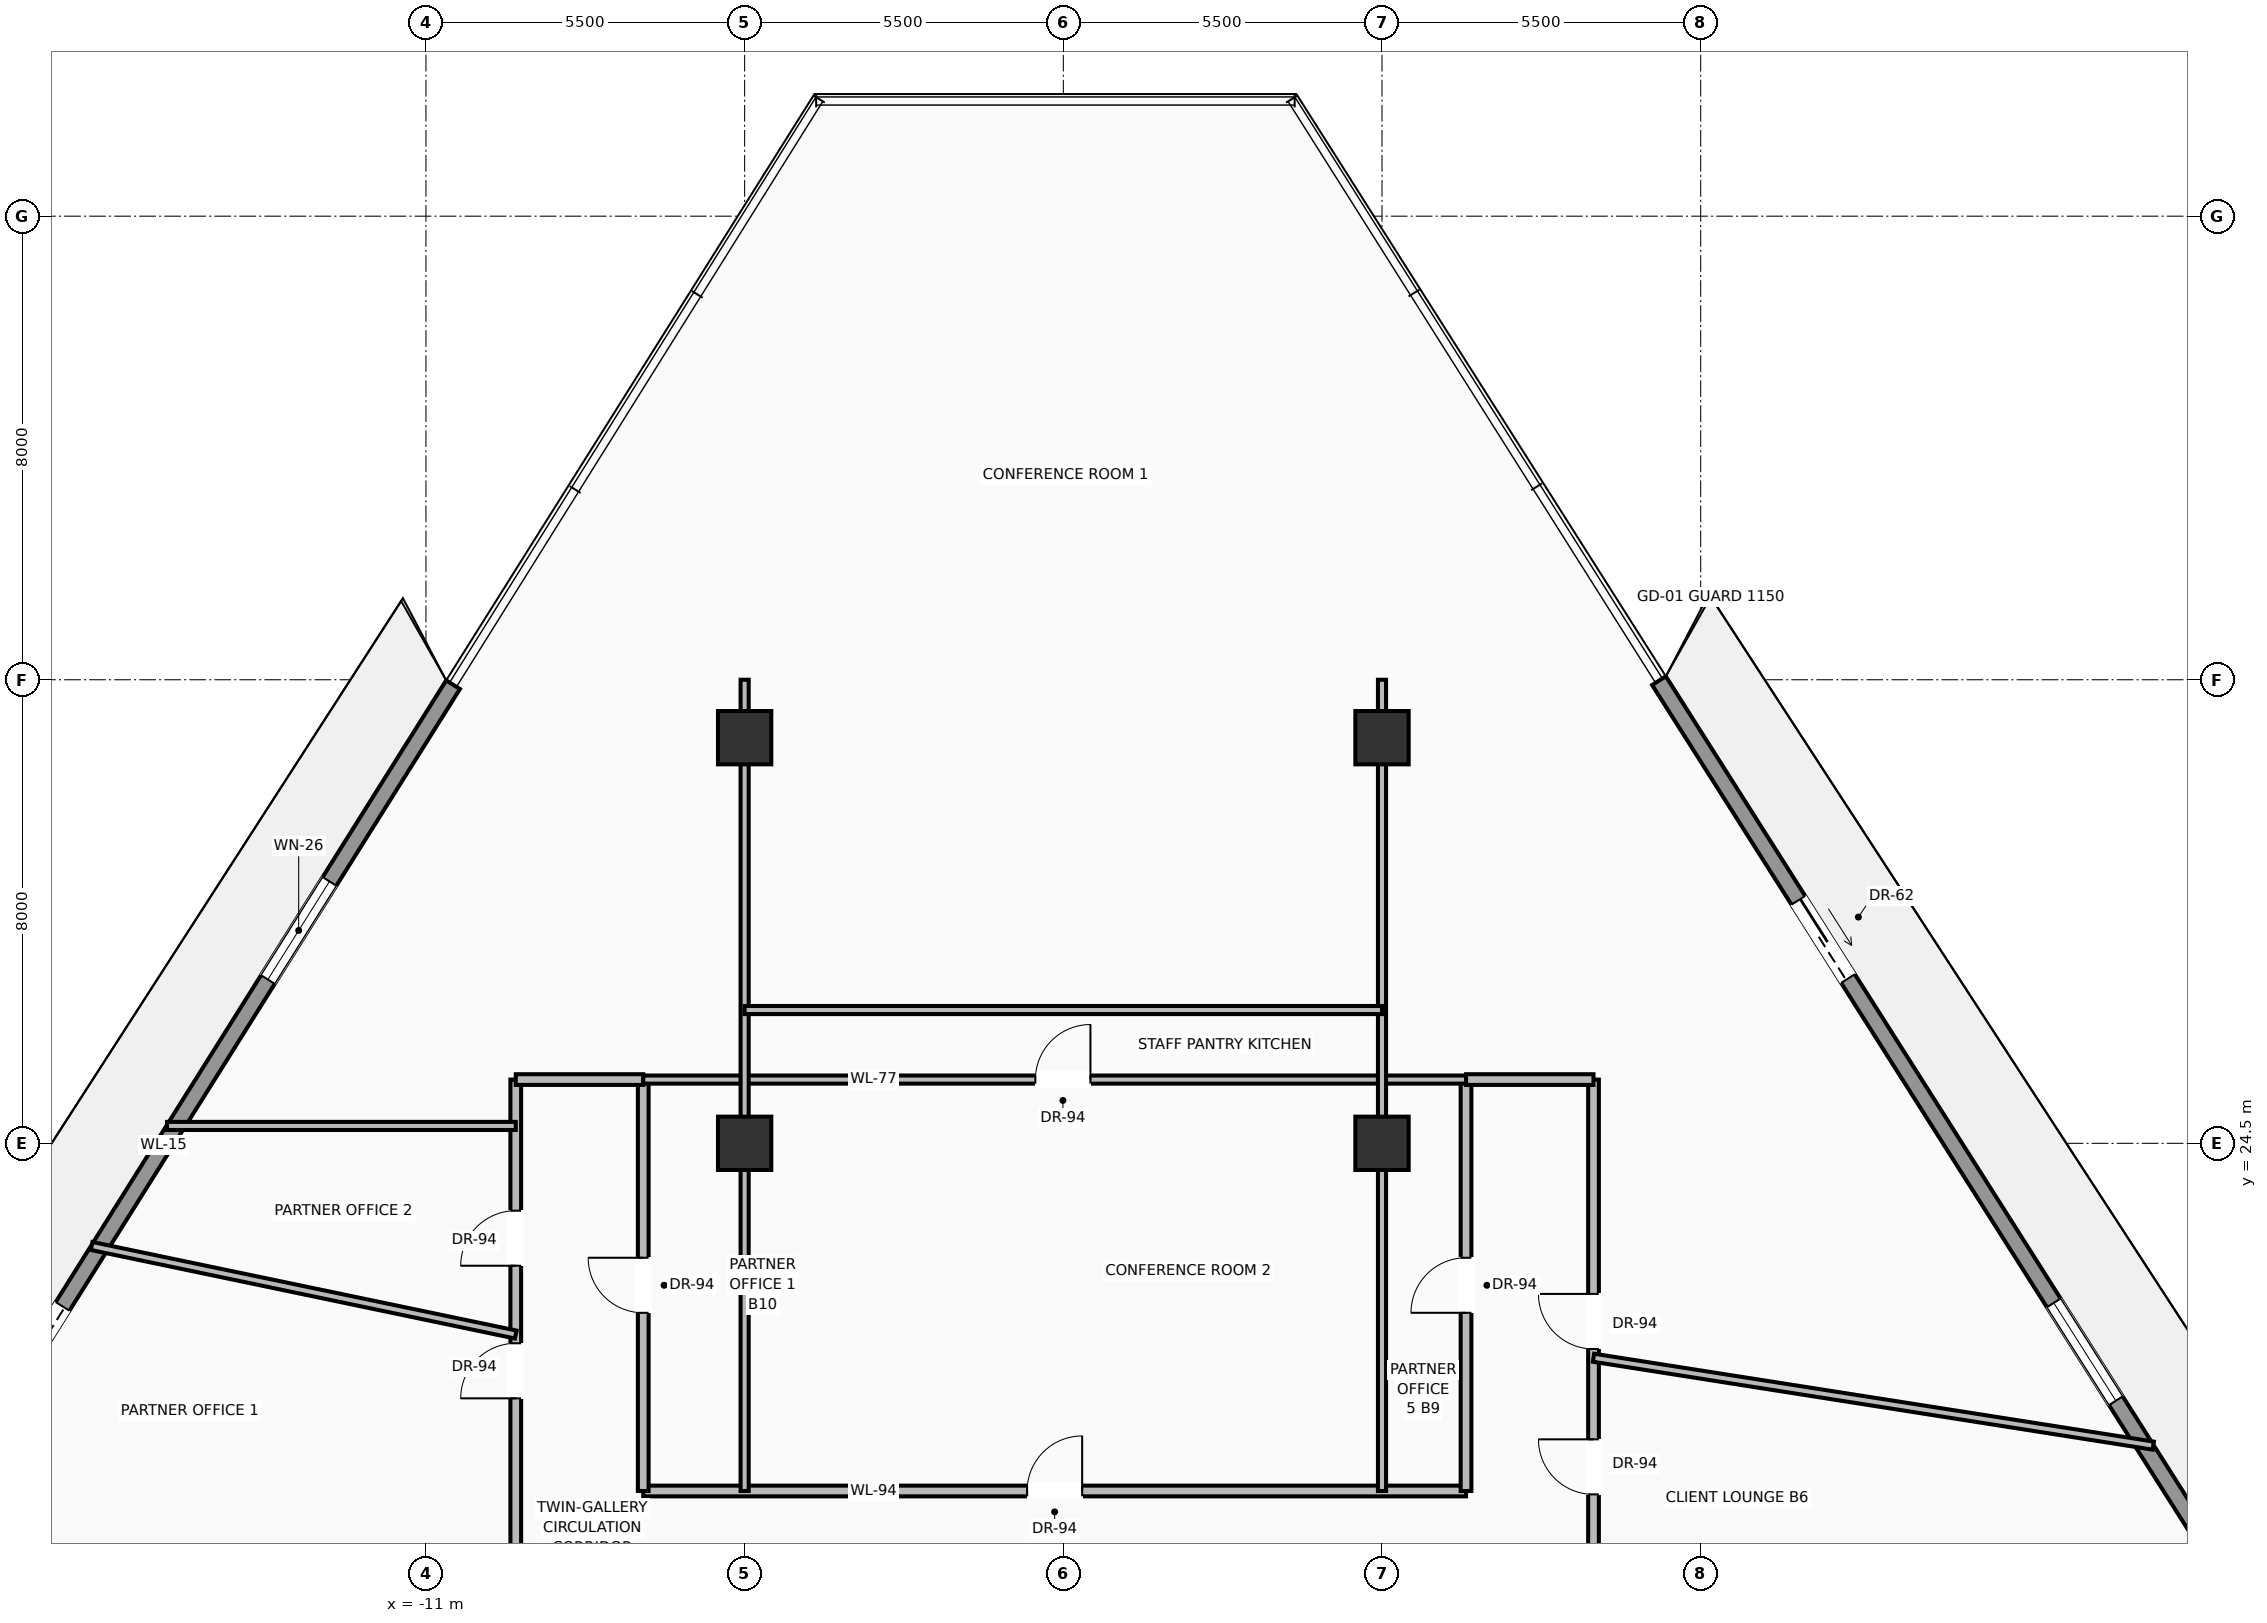
"""IFC4 building model, lengths in metres.
Left out: names, types, materials, properties, quantities, classifications, styles, units other than length and angle.
Written with IfcOpenShell. Run it as: python <this file> out.ifc"""

import sys

from ifc_helpers import new_model, si_unit, direction, frame, frame_2d, origin, origin_2d, place, context, subcontext, project, spatial, rectangle, extrude, source, transform, mapped, element, fill, save


model = new_model("IFC4")
c1 = context("Model", 3, precision=1e-05, world=origin(), true_north=direction((0.0, 1.0)))
c2 = subcontext(c1, "Body", "Model", "MODEL_VIEW")
j1 = project(units=[si_unit("LENGTHUNIT", "METRE"), si_unit("PLANEANGLEUNIT", "RADIAN")], contexts=[c1])
p1 = place(None, origin())
s1 = spatial("IfcSite", under=j1, at=p1, CompositionType="ELEMENT")
p2 = place(p1, origin())
s2 = spatial("IfcBuilding", under=s1, at=p2, CompositionType="ELEMENT")
p3 = place(p2, frame((0.0, 0.0, 174.7)))
s3 = spatial("IfcBuildingStorey", under=s2, at=p3, CompositionType="ELEMENT", Elevation=174.7)
m1 = source(origin(), c2, "Body", "SweptSolid", [
    extrude(rectangle(XDim=0.92, YDim=0.92, at=origin_2d()), origin(), (0.0, 0.0, 1.0), 3.7),
])
for number, where, z_axis, x_axis in (
    (1, (-5.5, 24.5, 0.0), (0.0, 0.0, 1.0), (1.0, 0.0, 0.0)),
    (2, (5.5, 24.5, 0.0), (0.0, 0.0, 1.0), (1.0, 0.0, 0.0)),
    (3, (-5.5, 31.5, 0.0), (0.0, 0.0, 1.0), (1.0, 0.0, 0.0)),
    (4, (5.5, 31.5, 0.0), (0.0, 0.0, 1.0), (1.0, 0.0, 0.0)),
):
    element("IfcColumn", number, at=place(p3, frame(where, z_axis=z_axis, x_axis=x_axis)), inside=s3, PredefinedType="COLUMN", context=c2, shape_type="MappedRepresentation", body=[
        mapped(m1, transform((0.0, 0.0, 0.0), scale=1.0)),
    ])
p4 = place(p3, frame((-20.519, 16.514, 0.0), z_axis=(0.0, 0.0, 1.0), x_axis=(0.531871143151, 0.846825299034, 0.0)))
e5 = element("IfcWall", 5, at=p4, inside=s3, PredefinedType="SOLIDWALL", context=c2, shape_type="SweptSolid", body=[
    extrude(rectangle(XDim=18.777, YDim=0.28, at=frame_2d((9.388, 0.0))), origin(), (0.0, 0.0, 1.0), 3.05),
])
p5 = place(p4, frame((4.506, 0.0, 0.0)))
e6 = element("IfcOpeningElement", 6, at=p5, cuts=e5, PredefinedType="OPENING", context=c2, shape_type="SweptSolid", body=[
    extrude(rectangle(XDim=1.6, YDim=2.35, at=frame_2d((0.8, 1.175))), frame((0.0, 0.15, 0.0), z_axis=(0.0, -1.0, 0.0), x_axis=(1.0, 0.0, 0.0)), (0.0, 0.0, 1.0), 0.3),
])
p6 = place(p4, frame((12.768, 0.0, 0.9)))
e7 = element("IfcOpeningElement", 7, at=p6, cuts=e5, PredefinedType="OPENING", context=c2, shape_type="SweptSolid", body=[
    extrude(rectangle(XDim=2.0, YDim=1.85, at=frame_2d((1.0, 0.925))), frame((0.0, 0.15, 0.0), z_axis=(0.0, -1.0, 0.0), x_axis=(1.0, 0.0, 0.0)), (0.0, 0.0, 1.0), 0.3),
])
p7 = place(p3, frame((10.28, 32.484, 0.0), z_axis=(0.0, 0.0, 1.0), x_axis=(0.53575660665, -0.844372464278, 0.0)))
e8 = element("IfcWall", 8, at=p7, inside=s3, PredefinedType="SOLIDWALL", context=c2, shape_type="SweptSolid", body=[
    extrude(rectangle(XDim=18.701, YDim=0.28, at=frame_2d((9.351, 0.0))), origin(), (0.0, 0.0, 1.0), 3.05),
])
p8 = place(p7, frame((4.488, 0.0, 0.0)))
e9 = element("IfcOpeningElement", 9, at=p8, cuts=e8, PredefinedType="OPENING", context=c2, shape_type="SweptSolid", body=[
    extrude(rectangle(XDim=1.6, YDim=2.35, at=frame_2d((0.8, 1.175))), frame((0.0, 0.15, 0.0), z_axis=(0.0, -1.0, 0.0), x_axis=(1.0, 0.0, 0.0)), (0.0, 0.0, 1.0), 0.3),
])
p9 = place(p7, frame((12.717, 0.0, 0.9)))
e10 = element("IfcOpeningElement", 10, at=p9, cuts=e8, PredefinedType="OPENING", context=c2, shape_type="SweptSolid", body=[
    extrude(rectangle(XDim=2.0, YDim=1.85, at=frame_2d((1.0, 0.925))), frame((0.0, 0.15, 0.0), z_axis=(0.0, -1.0, 0.0), x_axis=(1.0, 0.0, 0.0)), (0.0, 0.0, 1.0), 0.3),
])
p10 = place(p3, frame((-7.25, 18.5, 0.0), z_axis=(0.0, 0.0, 1.0), x_axis=(1.0, 0.0, 0.0)))
e11 = element("IfcWall", 11, at=p10, inside=s3, PredefinedType="PARTITIONING", context=c2, shape_type="SweptSolid", body=[
    extrude(rectangle(XDim=14.2, YDim=0.185, at=frame_2d((7.1, 0.0))), origin(), (0.0, 0.0, 1.0), 2.846),
])
p11 = place(p10, frame((6.625, 0.0, 0.0)))
e12 = element("IfcOpeningElement", 12, at=p11, cuts=e11, PredefinedType="OPENING", context=c2, shape_type="SweptSolid", body=[
    extrude(rectangle(XDim=0.95, YDim=2.2, at=frame_2d((0.475, 1.1))), frame((0.0, 0.103, 0.0), z_axis=(0.0, -1.0, 0.0), x_axis=(1.0, 0.0, 0.0)), (0.0, 0.0, 1.0), 0.205),
])
p12 = place(p3, frame((-7.25, 18.5, 0.0), z_axis=(0.0, 0.0, 1.0), x_axis=(0.0, 1.0, 0.0)))
e13 = element("IfcWall", 13, at=p12, inside=s3, PredefinedType="PARTITIONING", context=c2, shape_type="SweptSolid", body=[
    extrude(rectangle(XDim=7.1, YDim=0.185, at=frame_2d((3.55, 0.0))), origin(), (0.0, 0.0, 1.0), 2.846),
])
p13 = place(p12, frame((3.075, 0.0, 0.0)))
e14 = element("IfcOpeningElement", 14, at=p13, cuts=e13, PredefinedType="OPENING", context=c2, shape_type="SweptSolid", body=[
    extrude(rectangle(XDim=0.95, YDim=2.2, at=frame_2d((0.475, 1.1))), frame((0.0, 0.103, 0.0), z_axis=(0.0, -1.0, 0.0), x_axis=(1.0, 0.0, 0.0)), (0.0, 0.0, 1.0), 0.205),
])
p14 = place(p3, frame((6.95, 18.5, 0.0), z_axis=(0.0, 0.0, 1.0), x_axis=(0.0, 1.0, 0.0)))
e15 = element("IfcWall", 15, at=p14, inside=s3, PredefinedType="PARTITIONING", context=c2, shape_type="SweptSolid", body=[
    extrude(rectangle(XDim=7.1, YDim=0.185, at=frame_2d((3.55, 0.0))), origin(), (0.0, 0.0, 1.0), 2.846),
])
p15 = place(p14, frame((3.075, 0.0, 0.0)))
e16 = element("IfcOpeningElement", 16, at=p15, cuts=e15, PredefinedType="OPENING", context=c2, shape_type="SweptSolid", body=[
    extrude(rectangle(XDim=0.95, YDim=2.2, at=frame_2d((0.475, 1.1))), frame((0.0, 0.103, 0.0), z_axis=(0.0, -1.0, 0.0), x_axis=(1.0, 0.0, 0.0)), (0.0, 0.0, 1.0), 0.205),
])
p16 = place(p3, frame((-9.45, 16.4, 0.0), z_axis=(0.0, 0.0, 1.0), x_axis=(0.0, 1.0, 0.0)))
e17 = element("IfcWall", 17, at=p16, inside=s3, PredefinedType="PARTITIONING", context=c2, shape_type="SweptSolid", body=[
    extrude(rectangle(XDim=9.2, YDim=0.185, at=frame_2d((4.6, 0.0))), origin(), (0.0, 0.0, 1.0), 2.846),
])
p17 = place(p16, frame((3.699, 0.0, 0.0)))
e18 = element("IfcOpeningElement", 18, at=p17, cuts=e17, PredefinedType="OPENING", context=c2, shape_type="SweptSolid", body=[
    extrude(rectangle(XDim=0.95, YDim=2.2, at=frame_2d((0.475, 1.1))), frame((0.0, 0.103, 0.0), z_axis=(0.0, -1.0, 0.0), x_axis=(1.0, 0.0, 0.0)), (0.0, 0.0, 1.0), 0.205),
])
p18 = place(p16, frame((5.988, 0.0, 0.0)))
e19 = element("IfcOpeningElement", 19, at=p18, cuts=e17, PredefinedType="OPENING", context=c2, shape_type="SweptSolid", body=[
    extrude(rectangle(XDim=0.95, YDim=2.2, at=frame_2d((0.475, 1.1))), frame((0.0, 0.103, 0.0), z_axis=(0.0, -1.0, 0.0), x_axis=(1.0, 0.0, 0.0)), (0.0, 0.0, 1.0), 0.205),
])
p19 = place(p3, frame((9.15, 16.4, 0.0), z_axis=(0.0, 0.0, 1.0), x_axis=(0.0, 1.0, 0.0)))
e20 = element("IfcWall", 20, at=p19, inside=s3, PredefinedType="PARTITIONING", context=c2, shape_type="SweptSolid", body=[
    extrude(rectangle(XDim=9.2, YDim=0.185, at=frame_2d((4.6, 0.0))), origin(), (0.0, 0.0, 1.0), 2.846),
])
p20 = place(p19, frame((4.551, 0.0, 0.0)))
e21 = element("IfcOpeningElement", 21, at=p20, cuts=e20, PredefinedType="OPENING", context=c2, shape_type="SweptSolid", body=[
    extrude(rectangle(XDim=0.95, YDim=2.2, at=frame_2d((0.475, 1.1))), frame((0.0, 0.103, 0.0), z_axis=(0.0, -1.0, 0.0), x_axis=(1.0, 0.0, 0.0)), (0.0, 0.0, 1.0), 0.205),
])
p21 = place(p19, frame((2.042, 0.0, 0.0)))
e22 = element("IfcOpeningElement", 22, at=p21, cuts=e20, PredefinedType="OPENING", context=c2, shape_type="SweptSolid", body=[
    extrude(rectangle(XDim=0.95, YDim=2.2, at=frame_2d((0.475, 1.1))), frame((0.0, 0.103, 0.0), z_axis=(0.0, -1.0, 0.0), x_axis=(1.0, 0.0, 0.0)), (0.0, 0.0, 1.0), 0.205),
])
for number, where, z_axis, x_axis in (
    (23, (-9.45, 25.6, 0.0), (0.0, 0.0, 1.0), (1.0, 0.0, 0.0)),
    (24, (6.95, 25.6, 0.0), (0.0, 0.0, 1.0), (1.0, 0.0, 0.0)),
):
    element("IfcWall", number, at=place(p3, frame(where, z_axis=z_axis, x_axis=x_axis)), inside=s3, PredefinedType="PARTITIONING", context=c2, shape_type="SweptSolid", body=[
        extrude(rectangle(XDim=2.2, YDim=0.185, at=frame_2d((1.1, 0.0))), origin(), (0.0, 0.0, 1.0), 3.462),
    ])
p22 = place(p3, frame((-7.25, 25.6, 0.0), z_axis=(0.0, 0.0, 1.0), x_axis=(1.0, 0.0, 0.0)))
e25 = element("IfcWall", 25, at=p22, inside=s3, PredefinedType="PARTITIONING", context=c2, shape_type="SweptSolid", body=[
    extrude(rectangle(XDim=14.2, YDim=0.14, at=frame_2d((7.1, 0.0))), origin(), (0.0, 0.0, 1.0), 3.462),
])
p23 = place(p22, frame((6.768, 0.0, 0.0)))
e26 = element("IfcOpeningElement", 26, at=p23, cuts=e25, PredefinedType="OPENING", context=c2, shape_type="SweptSolid", body=[
    extrude(rectangle(XDim=0.95, YDim=2.2, at=frame_2d((0.475, 1.1))), frame((0.0, 0.08, 0.0), z_axis=(0.0, -1.0, 0.0), x_axis=(1.0, 0.0, 0.0)), (0.0, 0.0, 1.0), 0.16),
])
for number, where, z_axis, x_axis in (
    (27, (-5.5, 18.5, 0.0), (0.0, 0.0, 1.0), (0.0, 1.0, 0.0)),
    (28, (5.5, 18.5, 0.0), (0.0, 0.0, 1.0), (0.0, 1.0, 0.0)),
):
    element("IfcWall", number, at=place(p3, frame(where, z_axis=z_axis, x_axis=x_axis)), inside=s3, PredefinedType="PARTITIONING", context=c2, shape_type="SweptSolid", body=[
        extrude(rectangle(XDim=14.0, YDim=0.14, at=frame_2d((7.0, 0.0))), origin(), (0.0, 0.0, 1.0), 2.846),
    ])
p24 = place(p3, frame((-5.5, 26.8, 0.0), z_axis=(0.0, 0.0, 1.0), x_axis=(1.0, 0.0, 0.0)))
e29 = element("IfcWall", 29, at=p24, inside=s3, PredefinedType="PARTITIONING", context=c2, shape_type="SweptSolid", body=[
    extrude(rectangle(XDim=11.0, YDim=0.14, at=frame_2d((5.5, 0.0))), origin(), (0.0, 0.0, 1.0), 3.462),
])
p25 = place(p3, frame((-16.77, 22.728, 0.0), z_axis=(0.0, 0.0, 1.0), x_axis=(0.978892052861, -0.204377955872, 0.0)))
e30 = element("IfcWall", 30, at=p25, inside=s3, PredefinedType="PARTITIONING", context=c2, shape_type="SweptSolid", body=[
    extrude(rectangle(XDim=7.478, YDim=0.14, at=frame_2d((3.739, 0.0))), origin(), (0.0, 0.0, 1.0), 3.049),
])
p26 = place(p3, frame((-15.469, 24.8, 0.0), z_axis=(0.0, 0.0, 1.0), x_axis=(1.0, 0.0, 0.0)))
e31 = element("IfcWall", 31, at=p26, inside=s3, PredefinedType="PARTITIONING", context=c2, shape_type="SweptSolid", body=[
    extrude(rectangle(XDim=6.019, YDim=0.14, at=frame_2d((3.009, 0.0))), origin(), (0.0, 0.0, 1.0), 3.462),
])
p27 = place(p3, frame((9.15, 20.8, 0.0), z_axis=(0.0, 0.0, 1.0), x_axis=(0.987888554184, -0.155165087929, 0.0)))
e32 = element("IfcWall", 32, at=p27, inside=s3, PredefinedType="PARTITIONING", context=c2, shape_type="SweptSolid", body=[
    extrude(rectangle(XDim=9.779, YDim=0.14, at=frame_2d((4.889, 0.0))), origin(), (0.0, 0.0, 1.0), 3.049),
])
m2 = source(origin(), c2, "Body", "SweptSolid", [
    extrude(rectangle(XDim=1.6, YDim=2.35, at=frame_2d((0.8, 1.175))), frame((0.0, 0.025, 0.0), z_axis=(0.0, -1.0, 0.0), x_axis=(1.0, 0.0, 0.0)), (0.0, 0.0, 1.0), 0.05),
])
p28 = place(p5, origin())
e33 = element("IfcDoor", 33, at=p28, inside=s3, OperationType="SLIDING_TO_LEFT", PredefinedType="DOOR", context=c2, shape_type="MappedRepresentation", body=[
    mapped(m2, transform((0.0, 0.0, 0.0), scale=1.0)),
])
fill(e6, e33)
m3 = source(origin(), c2, "Body", "SweptSolid", [
    extrude(rectangle(XDim=2.0, YDim=1.85, at=frame_2d((1.0, 0.925))), frame((0.0, 0.03, 0.0), z_axis=(0.0, -1.0, 0.0), x_axis=(1.0, 0.0, 0.0)), (0.0, 0.0, 1.0), 0.06),
])
p29 = place(p6, origin())
e34 = element("IfcWindow", 34, at=p29, inside=s3, PartitioningType="SINGLE_PANEL", PredefinedType="WINDOW", context=c2, shape_type="MappedRepresentation", body=[
    mapped(m3, transform((0.0, 0.0, 0.0), scale=1.0)),
])
fill(e7, e34)
p30 = place(p8, origin())
e35 = element("IfcDoor", 35, at=p30, inside=s3, OperationType="SLIDING_TO_RIGHT", PredefinedType="DOOR", context=c2, shape_type="MappedRepresentation", body=[
    mapped(m2, transform((0.0, 0.0, 0.0), scale=1.0)),
])
fill(e9, e35)
p31 = place(p9, origin())
e36 = element("IfcWindow", 36, at=p31, inside=s3, PartitioningType="SINGLE_PANEL", PredefinedType="WINDOW", context=c2, shape_type="MappedRepresentation", body=[
    mapped(m3, transform((0.0, 0.0, 0.0), scale=1.0)),
])
fill(e10, e36)
m4 = source(origin(), c2, "Body", "SweptSolid", [
    extrude(rectangle(XDim=0.95, YDim=2.2, at=frame_2d((0.475, 1.1))), frame((0.0, 0.025, 0.0), z_axis=(0.0, -1.0, 0.0), x_axis=(1.0, 0.0, 0.0)), (0.0, 0.0, 1.0), 0.05),
])
p32 = place(p11, origin())
e37 = element("IfcDoor", 37, at=p32, inside=s3, OperationType="SINGLE_SWING_RIGHT", PredefinedType="DOOR", context=c2, shape_type="MappedRepresentation", body=[
    mapped(m4, transform((0.0, 0.0, 0.0), scale=1.0)),
])
fill(e12, e37)
p33 = place(p17, origin())
e38 = element("IfcDoor", 38, at=p33, inside=s3, OperationType="SINGLE_SWING_LEFT", PredefinedType="DOOR", context=c2, shape_type="MappedRepresentation", body=[
    mapped(m4, transform((0.0, 0.0, 0.0), scale=1.0)),
])
fill(e18, e38)
p34 = place(p20, origin())
e39 = element("IfcDoor", 39, at=p34, inside=s3, OperationType="SINGLE_SWING_RIGHT", PredefinedType="DOOR", context=c2, shape_type="MappedRepresentation", body=[
    mapped(m4, transform((0.0, 0.0, 0.0), scale=1.0)),
])
fill(e21, e39)
p35 = place(p21, origin())
e40 = element("IfcDoor", 40, at=p35, inside=s3, OperationType="SINGLE_SWING_RIGHT", PredefinedType="DOOR", context=c2, shape_type="MappedRepresentation", body=[
    mapped(m4, transform((0.0, 0.0, 0.0), scale=1.0)),
])
fill(e22, e40)
p36 = place(p15, origin())
e41 = element("IfcDoor", 41, at=p36, inside=s3, OperationType="SINGLE_SWING_LEFT", PredefinedType="DOOR", context=c2, shape_type="MappedRepresentation", body=[
    mapped(m4, transform((0.0, 0.0, 0.0), scale=1.0)),
])
fill(e16, e41)
p37 = place(p13, origin())
e42 = element("IfcDoor", 42, at=p37, inside=s3, OperationType="SINGLE_SWING_RIGHT", PredefinedType="DOOR", context=c2, shape_type="MappedRepresentation", body=[
    mapped(m4, transform((0.0, 0.0, 0.0), scale=1.0)),
])
fill(e14, e42)
p38 = place(p18, origin())
e43 = element("IfcDoor", 43, at=p38, inside=s3, OperationType="SINGLE_SWING_LEFT", PredefinedType="DOOR", context=c2, shape_type="MappedRepresentation", body=[
    mapped(m4, transform((0.0, 0.0, 0.0), scale=1.0)),
])
fill(e19, e43)
p39 = place(p23, origin())
e44 = element("IfcDoor", 44, at=p39, inside=s3, OperationType="SINGLE_SWING_RIGHT", PredefinedType="DOOR", context=c2, shape_type="MappedRepresentation", body=[
    mapped(m4, transform((0.0, 0.0, 0.0), scale=1.0)),
])
fill(e26, e44)
save(model, sys.argv[1])
